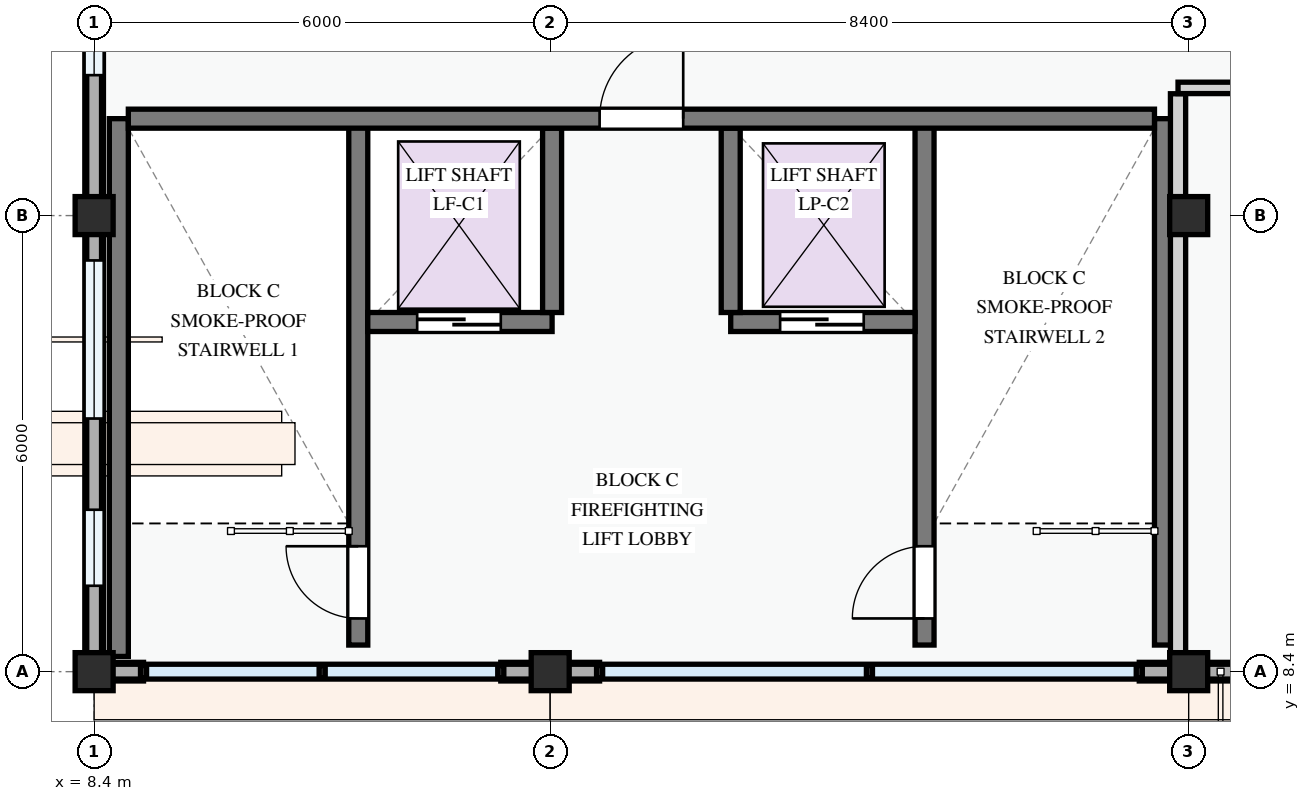
"""IFC4 building model, lengths in metres.
Left out: names, types, materials, properties, quantities, classifications, styles, units other than length and angle.
Written with IfcOpenShell. Run it as: python <this file> out.ifc"""

import sys

from ifc_helpers import new_model, si_unit, direction, frame, frame_2d, origin, origin_2d, place, context, subcontext, project, spatial, polyline, rectangle, outline, extrude, element, fill, save


model = new_model("IFC4")
c1 = context("Model", 3, precision=1e-05, world=origin(), true_north=direction((0.0, 1.0)))
c2 = subcontext(c1, "Body", "Model", "MODEL_VIEW")
j1 = project(units=[si_unit("LENGTHUNIT", "METRE"), si_unit("PLANEANGLEUNIT", "RADIAN")], contexts=[c1])
p1 = place(None, origin())
s1 = spatial("IfcSite", under=j1, at=p1, CompositionType="ELEMENT")
p2 = place(p1, origin())
s2 = spatial("IfcBuilding", under=s1, at=p2, CompositionType="ELEMENT")
p3 = place(p2, frame((0.0, 0.0, 34.5)))
s3 = spatial("IfcBuildingStorey", under=s2, at=p3, CompositionType="ELEMENT", Elevation=34.5)
for number, where, z_axis, x_axis in (
    (1, (8.4, 8.4, 0.0), (0.0, 0.0, 1.0), (1.0, 0.0, 0.0)),
    (2, (8.4, 14.4, 0.0), (0.0, 0.0, 1.0), (1.0, 0.0, 0.0)),
    (3, (14.4, 8.4, 0.0), (0.0, 0.0, 1.0), (1.0, 0.0, 0.0)),
    (4, (22.8, 8.4, 0.0), (0.0, 0.0, 1.0), (1.0, 0.0, 0.0)),
    (5, (22.8, 14.4, 0.0), (0.0, 0.0, 1.0), (1.0, 0.0, 0.0)),
):
    element("IfcColumn", number, at=place(p3, frame(where, z_axis=z_axis, x_axis=x_axis)), inside=s3, PredefinedType="COLUMN", context=c2, shape_type="SweptSolid", body=[
        extrude(rectangle(XDim=0.5, YDim=0.5, at=origin_2d()), origin(), (0.0, 0.0, 1.0), 3.3),
    ])
p4 = place(p3, frame((8.4, 22.8, 0.0), z_axis=(0.0, 0.0, 1.0), x_axis=(0.0, -1.0, 0.0)))
e6 = element("IfcWall", 6, at=p4, inside=s3, PredefinedType="STANDARD", context=c2, shape_type="SweptSolid", body=[
    extrude(rectangle(XDim=8.4, YDim=0.245, at=frame_2d((4.2, 0.0))), origin(), (0.0, 0.0, 1.0), 2.345),
])
p5 = place(p4, frame((1.305, 0.0, 0.78)))
e7 = element("IfcOpeningElement", 7, at=p5, cuts=e6, PredefinedType="OPENING", context=c2, shape_type="SweptSolid", body=[
    extrude(rectangle(XDim=1.78, YDim=1.42, at=frame_2d((0.89, 0.71))), frame((0.0, 0.133, 0.0), z_axis=(0.0, -1.0, 0.0), x_axis=(1.0, 0.0, 0.0)), (0.0, 0.0, 1.0), 0.265),
])
p6 = place(p4, frame((4.772, 0.0, 0.78)))
e8 = element("IfcOpeningElement", 8, at=p6, cuts=e6, PredefinedType="OPENING", context=c2, shape_type="SweptSolid", body=[
    extrude(rectangle(XDim=1.78, YDim=1.42, at=frame_2d((0.89, 0.71))), frame((0.0, 0.133, 0.0), z_axis=(0.0, -1.0, 0.0), x_axis=(1.0, 0.0, 0.0)), (0.0, 0.0, 1.0), 0.265),
])
p7 = place(p3, frame((8.4, 14.4, 0.0), z_axis=(0.0, 0.0, 1.0), x_axis=(0.0, -1.0, 0.0)))
e9 = element("IfcWall", 9, at=p7, inside=s3, PredefinedType="STANDARD", context=c2, shape_type="SweptSolid", body=[
    extrude(rectangle(XDim=6.0, YDim=0.245, at=frame_2d((3.0, 0.0))), origin(), (0.0, 0.0, 1.0), 2.445),
])
p8 = place(p7, frame((0.59, 0.0, 0.78)))
e10 = element("IfcOpeningElement", 10, at=p8, cuts=e9, PredefinedType="OPENING", context=c2, shape_type="SweptSolid", body=[
    extrude(rectangle(XDim=2.08, YDim=1.52, at=frame_2d((1.04, 0.76))), frame((0.0, 0.133, 0.0), z_axis=(0.0, -1.0, 0.0), x_axis=(1.0, 0.0, 0.0)), (0.0, 0.0, 1.0), 0.265),
])
p9 = place(p7, frame((3.87, 0.0, 0.78)))
e11 = element("IfcOpeningElement", 11, at=p9, cuts=e9, PredefinedType="OPENING", context=c2, shape_type="SweptSolid", body=[
    extrude(rectangle(XDim=1.0, YDim=1.25, at=frame_2d((0.5, 0.625))), frame((0.0, 0.133, 0.0), z_axis=(0.0, -1.0, 0.0), x_axis=(1.0, 0.0, 0.0)), (0.0, 0.0, 1.0), 0.265),
])
p10 = place(p3, frame((8.524, 8.4, 0.0), z_axis=(0.0, 0.0, 1.0), x_axis=(1.0, 0.0, 0.0)))
e12 = element("IfcWall", 12, at=p10, inside=s3, PredefinedType="STANDARD", context=c2, shape_type="SweptSolid", body=[
    extrude(rectangle(XDim=0.526, YDim=0.245, at=frame_2d((0.263, 0.0))), origin(), (0.0, 0.0, 1.0), 3.04),
])
p11 = place(p3, frame((13.75, 8.4, 0.0), z_axis=(0.0, 0.0, 1.0), x_axis=(1.0, 0.0, 0.0)))
e13 = element("IfcWall", 13, at=p11, inside=s3, PredefinedType="STANDARD", context=c2, shape_type="SweptSolid", body=[
    extrude(rectangle(XDim=0.65, YDim=0.245, at=frame_2d((0.325, 0.0))), origin(), (0.0, 0.0, 1.0), 3.04),
])
for number, where, z_axis, x_axis in (
    (14, (14.4, 8.4, 0.0), (0.0, 0.0, 1.0), (1.0, 0.0, 0.0)),
    (15, (22.15, 8.4, 0.0), (0.0, 0.0, 1.0), (1.0, 0.0, 0.0)),
):
    element("IfcWall", number, at=place(p3, frame(where, z_axis=z_axis, x_axis=x_axis)), inside=s3, PredefinedType="STANDARD", context=c2, shape_type="SweptSolid", body=[
        extrude(rectangle(XDim=0.65, YDim=0.245, at=frame_2d((0.325, 0.0))), origin(), (0.0, 0.0, 1.0), 3.04),
    ])
p12 = place(p3, frame((22.8, 8.4, 0.0), z_axis=(0.0, 0.0, 1.0), x_axis=(1.0, 0.0, 0.0)))
e16 = element("IfcWall", 16, at=p12, inside=s3, PredefinedType="STANDARD", context=c2, shape_type="SweptSolid", body=[
    extrude(rectangle(XDim=6.0, YDim=0.245, at=frame_2d((3.0, 0.0))), origin(), (0.0, 0.0, 1.0), 2.525),
])
p13 = place(p12, frame((0.62, 0.0, 0.0)))
e17 = element("IfcOpeningElement", 17, at=p13, cuts=e16, PredefinedType="OPENING", context=c2, shape_type="SweptSolid", body=[
    extrude(rectangle(XDim=1.3, YDim=2.15, at=frame_2d((0.65, 1.075))), frame((0.0, 0.133, 0.0), z_axis=(0.0, -1.0, 0.0), x_axis=(1.0, 0.0, 0.0)), (0.0, 0.0, 1.0), 0.265),
])
p14 = place(p12, frame((2.305, 0.0, 0.78)))
e18 = element("IfcOpeningElement", 18, at=p14, cuts=e16, PredefinedType="OPENING", context=c2, shape_type="SweptSolid", body=[
    extrude(rectangle(XDim=1.2, YDim=1.5, at=frame_2d((0.6, 0.75))), frame((0.0, 0.133, 0.0), z_axis=(0.0, -1.0, 0.0), x_axis=(1.0, 0.0, 0.0)), (0.0, 0.0, 1.0), 0.265),
])
p15 = place(p12, frame((4.225, 0.0, 0.78)))
e19 = element("IfcOpeningElement", 19, at=p15, cuts=e16, PredefinedType="OPENING", context=c2, shape_type="SweptSolid", body=[
    extrude(rectangle(XDim=1.2, YDim=1.35, at=frame_2d((0.6, 0.675))), frame((0.0, 0.133, 0.0), z_axis=(0.0, -1.0, 0.0), x_axis=(1.0, 0.0, 0.0)), (0.0, 0.0, 1.0), 0.265),
])
p16 = place(p3, frame((8.4, 22.8, 3.3), z_axis=(0.0, 0.0, 1.0), x_axis=(0.0, -1.0, 0.0)))
e20 = element("IfcWall", 20, at=p16, inside=s3, PredefinedType="PARAPET", context=c2, shape_type="SweptSolid", body=[
    extrude(outline(polyline([(0.0, 0.0), (8.4, 0.0), (8.4, 1.12), (7.7, 1.322), (7.0, 1.484), (6.3, 1.618), (5.6, 1.717), (4.9, 1.779), (4.2, 1.8), (3.5, 1.779), (2.8, 1.717), (2.1, 1.618), (1.4, 1.484), (0.7, 1.322), (0.0, 1.12), (0.0, 0.0)])), frame((0.0, 0.098, 0.0), z_axis=(0.0, -1.0, 0.0), x_axis=(1.0, 0.0, 0.0)), (0.0, 0.0, 1.0), 0.195),
])
for number, where, z_axis, x_axis in (
    (21, (8.4, 14.4, 3.3), (0.0, 0.0, 1.0), (0.0, -1.0, 0.0)),
    (22, (8.4, 8.4, 3.3), (0.0, 0.0, 1.0), (1.0, 0.0, 0.0)),
):
    element("IfcWall", number, at=place(p3, frame(where, z_axis=z_axis, x_axis=x_axis)), inside=s3, PredefinedType="PARAPET", context=c2, shape_type="SweptSolid", body=[
        extrude(outline(polyline([(0.0, 0.0), (6.0, 0.0), (6.0, 1.12), (5.5, 1.322), (5.0, 1.484), (4.5, 1.618), (4.0, 1.717), (3.5, 1.779), (3.0, 1.8), (2.5, 1.779), (2.0, 1.717), (1.5, 1.618), (1.0, 1.484), (0.5, 1.322), (0.0, 1.12), (0.0, 0.0)])), frame((0.0, 0.098, 0.0), z_axis=(0.0, -1.0, 0.0), x_axis=(1.0, 0.0, 0.0)), (0.0, 0.0, 1.0), 0.195),
    ])
p17 = place(p3, frame((14.4, 8.4, 3.3), z_axis=(0.0, 0.0, 1.0), x_axis=(1.0, 0.0, 0.0)))
e23 = element("IfcWall", 23, at=p17, inside=s3, PredefinedType="PARAPET", context=c2, shape_type="SweptSolid", body=[
    extrude(outline(polyline([(0.0, 0.0), (8.4, 0.0), (8.4, 1.12), (7.7, 1.322), (7.0, 1.484), (6.3, 1.618), (5.6, 1.717), (4.9, 1.779), (4.2, 1.8), (3.5, 1.779), (2.8, 1.717), (2.1, 1.618), (1.4, 1.484), (0.7, 1.322), (0.0, 1.12), (0.0, 0.0)])), frame((0.0, 0.098, 0.0), z_axis=(0.0, -1.0, 0.0), x_axis=(1.0, 0.0, 0.0)), (0.0, 0.0, 1.0), 0.195),
])
p18 = place(p3, frame((22.8, 8.4, 3.3), z_axis=(0.0, 0.0, 1.0), x_axis=(1.0, 0.0, 0.0)))
e24 = element("IfcWall", 24, at=p18, inside=s3, PredefinedType="PARAPET", context=c2, shape_type="SweptSolid", body=[
    extrude(outline(polyline([(0.0, 0.0), (6.0, 0.0), (6.0, 1.12), (5.5, 1.322), (5.0, 1.484), (4.5, 1.618), (4.0, 1.717), (3.5, 1.779), (3.0, 1.8), (2.5, 1.779), (2.0, 1.717), (1.5, 1.618), (1.0, 1.484), (0.5, 1.322), (0.0, 1.12), (0.0, 0.0)])), frame((0.0, 0.098, 0.0), z_axis=(0.0, -1.0, 0.0), x_axis=(1.0, 0.0, 0.0)), (0.0, 0.0, 1.0), 0.195),
])
p19 = place(p3, frame((11.875, 8.75, 0.0), z_axis=(0.0, 0.0, 1.0), x_axis=(0.0, 1.0, 0.0)))
e25 = element("IfcWall", 25, at=p19, inside=s3, PredefinedType="SHEAR", context=c2, shape_type="SweptSolid", body=[
    extrude(rectangle(XDim=6.925, YDim=0.25, at=frame_2d((3.462, 0.0))), origin(), (0.0, 0.0, 1.0), 3.0),
])
p20 = place(p19, frame((0.35, 0.0, 0.0)))
e26 = element("IfcOpeningElement", 26, at=p20, cuts=e25, PredefinedType="OPENING", context=c2, shape_type="SweptSolid", body=[
    extrude(rectangle(XDim=0.95, YDim=2.1, at=frame_2d((0.475, 1.05))), frame((0.0, 0.135, 0.0), z_axis=(0.0, -1.0, 0.0), x_axis=(1.0, 0.0, 0.0)), (0.0, 0.0, 1.0), 0.27),
])
p21 = place(p3, frame((8.725, 8.6, 0.0), z_axis=(0.0, 0.0, 1.0), x_axis=(0.0, 1.0, 0.0)))
e27 = element("IfcWall", 27, at=p21, inside=s3, PredefinedType="SHEAR", context=c2, shape_type="SweptSolid", body=[
    extrude(rectangle(XDim=7.075, YDim=0.25, at=frame_2d((3.538, 0.0))), origin(), (0.0, 0.0, 1.0), 3.0),
])
p22 = place(p3, frame((22.475, 8.75, 0.0), z_axis=(0.0, 0.0, 1.0), x_axis=(0.0, 1.0, 0.0)))
e28 = element("IfcWall", 28, at=p22, inside=s3, PredefinedType="SHEAR", context=c2, shape_type="SweptSolid", body=[
    extrude(rectangle(XDim=6.925, YDim=0.25, at=frame_2d((3.462, 0.0))), origin(), (0.0, 0.0, 1.0), 3.0),
])
p23 = place(p3, frame((19.325, 8.75, 0.0), z_axis=(0.0, 0.0, 1.0), x_axis=(0.0, 1.0, 0.0)))
e29 = element("IfcWall", 29, at=p23, inside=s3, PredefinedType="SHEAR", context=c2, shape_type="SweptSolid", body=[
    extrude(rectangle(XDim=6.925, YDim=0.25, at=frame_2d((3.462, 0.0))), origin(), (0.0, 0.0, 1.0), 3.0),
])
p24 = place(p23, frame((0.35, 0.0, 0.0)))
e30 = element("IfcOpeningElement", 30, at=p24, cuts=e29, PredefinedType="OPENING", context=c2, shape_type="SweptSolid", body=[
    extrude(rectangle(XDim=0.95, YDim=2.1, at=frame_2d((0.475, 1.05))), frame((0.0, 0.135, 0.0), z_axis=(0.0, -1.0, 0.0), x_axis=(1.0, 0.0, 0.0)), (0.0, 0.0, 1.0), 0.27),
])
p25 = place(p3, frame((12.0, 13.0, 0.0), z_axis=(0.0, 0.0, 1.0), x_axis=(1.0, 0.0, 0.0)))
e31 = element("IfcWall", 31, at=p25, inside=s3, PredefinedType="SHEAR", context=c2, shape_type="SweptSolid", body=[
    extrude(rectangle(XDim=2.425, YDim=0.25, at=frame_2d((1.212, 0.0))), origin(), (0.0, 0.0, 1.0), 3.0),
])
p26 = place(p25, frame((0.65, 0.0, 0.0)))
e32 = element("IfcOpeningElement", 32, at=p26, cuts=e31, PredefinedType="OPENING", context=c2, shape_type="SweptSolid", body=[
    extrude(rectangle(XDim=1.1, YDim=2.15, at=frame_2d((0.55, 1.075))), frame((0.0, 0.135, 0.0), z_axis=(0.0, -1.0, 0.0), x_axis=(1.0, 0.0, 0.0)), (0.0, 0.0, 1.0), 0.27),
])
p27 = place(p3, frame((16.775, 13.0, 0.0), z_axis=(0.0, 0.0, 1.0), x_axis=(1.0, 0.0, 0.0)))
e33 = element("IfcWall", 33, at=p27, inside=s3, PredefinedType="SHEAR", context=c2, shape_type="SweptSolid", body=[
    extrude(rectangle(XDim=2.425, YDim=0.25, at=frame_2d((1.212, 0.0))), origin(), (0.0, 0.0, 1.0), 3.0),
])
p28 = place(p27, frame((0.65, 0.0, 0.0)))
e34 = element("IfcOpeningElement", 34, at=p28, cuts=e33, PredefinedType="OPENING", context=c2, shape_type="SweptSolid", body=[
    extrude(rectangle(XDim=1.1, YDim=2.15, at=frame_2d((0.55, 1.075))), frame((0.0, 0.135, 0.0), z_axis=(0.0, -1.0, 0.0), x_axis=(1.0, 0.0, 0.0)), (0.0, 0.0, 1.0), 0.27),
])
for number, where, z_axis, x_axis in (
    (35, (14.425, 13.125, 0.0), (0.0, 0.0, 1.0), (0.0, 1.0, 0.0)),
    (36, (16.775, 13.125, 0.0), (0.0, 0.0, 1.0), (0.0, 1.0, 0.0)),
):
    element("IfcWall", number, at=place(p3, frame(where, z_axis=z_axis, x_axis=x_axis)), inside=s3, PredefinedType="SHEAR", context=c2, shape_type="SweptSolid", body=[
        extrude(rectangle(XDim=2.425, YDim=0.25, at=frame_2d((1.212, 0.0))), origin(), (0.0, 0.0, 1.0), 3.0),
    ])
p29 = place(p3, frame((8.85, 15.675, 0.0), z_axis=(0.0, 0.0, 1.0), x_axis=(1.0, 0.0, 0.0)))
e37 = element("IfcWall", 37, at=p29, inside=s3, PredefinedType="SHEAR", context=c2, shape_type="SweptSolid", body=[
    extrude(rectangle(XDim=13.5, YDim=0.25, at=frame_2d((6.75, 0.0))), origin(), (0.0, 0.0, 1.0), 3.0),
])
p30 = place(p29, frame((6.2, 0.0, 0.0)))
e38 = element("IfcOpeningElement", 38, at=p30, cuts=e37, PredefinedType="OPENING", context=c2, shape_type="SweptSolid", body=[
    extrude(rectangle(XDim=1.1, YDim=2.15, at=frame_2d((0.55, 1.075))), frame((0.0, 0.135, 0.0), z_axis=(0.0, -1.0, 0.0), x_axis=(1.0, 0.0, 0.0)), (0.0, 0.0, 1.0), 0.27),
])
p31 = place(p3, frame((22.66, 8.524, 0.0), z_axis=(0.0, 0.0, 1.0), x_axis=(0.0, 1.0, 0.0)))
e39 = element("IfcWall", 39, at=p31, inside=s3, PredefinedType="PARTITIONING", context=c2, shape_type="SweptSolid", body=[
    extrude(rectangle(XDim=7.479, YDim=0.2, at=frame_2d((3.739, 0.0))), origin(), (0.0, 0.0, 1.0), 2.425),
])
p32 = place(p3, frame((22.66, 16.08, 0.0), z_axis=(0.0, 0.0, 1.0), x_axis=(1.0, 0.0, 0.0)))
e40 = element("IfcWall", 40, at=p32, inside=s3, PredefinedType="PARTITIONING", context=c2, shape_type="SweptSolid", body=[
    extrude(rectangle(XDim=20.416, YDim=0.15, at=frame_2d((10.208, 0.0))), origin(), (0.0, 0.0, 1.0), 3.0),
])
p33 = place(p32, frame((2.691, 0.0, 0.0)))
e41 = element("IfcOpeningElement", 41, at=p33, cuts=e40, PredefinedType="OPENING", context=c2, shape_type="SweptSolid", body=[
    extrude(rectangle(XDim=0.92, YDim=2.1, at=frame_2d((0.46, 1.05))), frame((0.0, 0.085, 0.0), z_axis=(0.0, -1.0, 0.0), x_axis=(1.0, 0.0, 0.0)), (0.0, 0.0, 1.0), 0.17),
])
p34 = place(p32, frame((9.91, 0.0, 0.0)))
e42 = element("IfcOpeningElement", 42, at=p34, cuts=e40, PredefinedType="OPENING", context=c2, shape_type="SweptSolid", body=[
    extrude(rectangle(XDim=0.92, YDim=2.1, at=frame_2d((0.46, 1.05))), frame((0.0, 0.085, 0.0), z_axis=(0.0, -1.0, 0.0), x_axis=(1.0, 0.0, 0.0)), (0.0, 0.0, 1.0), 0.17),
])
p35 = place(p6, origin())
e43 = element("IfcWindow", 43, at=p35, inside=s3, PartitioningType="DOUBLE_PANEL_VERTICAL", PredefinedType="WINDOW", context=c2, shape_type="SweptSolid", body=[
    extrude(rectangle(XDim=1.78, YDim=1.42, at=frame_2d((0.89, 0.71))), frame((0.0, 0.03, 0.0), z_axis=(0.0, -1.0, 0.0), x_axis=(1.0, 0.0, 0.0)), (0.0, 0.0, 1.0), 0.06),
])
fill(e8, e43)
p36 = place(p8, origin())
e44 = element("IfcWindow", 44, at=p36, inside=s3, PartitioningType="DOUBLE_PANEL_VERTICAL", PredefinedType="WINDOW", context=c2, shape_type="SweptSolid", body=[
    extrude(rectangle(XDim=2.08, YDim=1.52, at=frame_2d((1.04, 0.76))), frame((0.0, 0.03, 0.0), z_axis=(0.0, -1.0, 0.0), x_axis=(1.0, 0.0, 0.0)), (0.0, 0.0, 1.0), 0.06),
])
fill(e10, e44)
p37 = place(p9, origin())
e45 = element("IfcWindow", 45, at=p37, inside=s3, PartitioningType="SINGLE_PANEL", PredefinedType="WINDOW", context=c2, shape_type="SweptSolid", body=[
    extrude(rectangle(XDim=1.0, YDim=1.25, at=frame_2d((0.5, 0.625))), frame((0.0, 0.03, 0.0), z_axis=(0.0, -1.0, 0.0), x_axis=(1.0, 0.0, 0.0)), (0.0, 0.0, 1.0), 0.06),
])
fill(e11, e45)
p38 = place(p20, origin())
e46 = element("IfcDoor", 46, at=p38, inside=s3, OperationType="SINGLE_SWING_RIGHT", PredefinedType="DOOR", context=c2, shape_type="SweptSolid", body=[
    extrude(rectangle(XDim=0.95, YDim=2.1, at=frame_2d((0.475, 1.05))), frame((0.0, 0.025, 0.0), z_axis=(0.0, -1.0, 0.0), x_axis=(1.0, 0.0, 0.0)), (0.0, 0.0, 1.0), 0.05),
])
fill(e26, e46)
p39 = place(p24, origin())
e47 = element("IfcDoor", 47, at=p39, inside=s3, OperationType="SINGLE_SWING_LEFT", PredefinedType="DOOR", context=c2, shape_type="SweptSolid", body=[
    extrude(rectangle(XDim=0.95, YDim=2.1, at=frame_2d((0.475, 1.05))), frame((0.0, 0.025, 0.0), z_axis=(0.0, -1.0, 0.0), x_axis=(1.0, 0.0, 0.0)), (0.0, 0.0, 1.0), 0.05),
])
fill(e30, e47)
p40 = place(p26, origin())
e48 = element("IfcDoor", 48, at=p40, inside=s3, OperationType="SLIDING_TO_LEFT", PredefinedType="DOOR", context=c2, shape_type="SweptSolid", body=[
    extrude(rectangle(XDim=1.1, YDim=2.15, at=frame_2d((0.55, 1.075))), frame((0.0, 0.025, 0.0), z_axis=(0.0, -1.0, 0.0), x_axis=(1.0, 0.0, 0.0)), (0.0, 0.0, 1.0), 0.05),
])
fill(e32, e48)
p41 = place(p28, origin())
e49 = element("IfcDoor", 49, at=p41, inside=s3, OperationType="SLIDING_TO_LEFT", PredefinedType="DOOR", context=c2, shape_type="SweptSolid", body=[
    extrude(rectangle(XDim=1.1, YDim=2.15, at=frame_2d((0.55, 1.075))), frame((0.0, 0.025, 0.0), z_axis=(0.0, -1.0, 0.0), x_axis=(1.0, 0.0, 0.0)), (0.0, 0.0, 1.0), 0.05),
])
fill(e34, e49)
p42 = place(p30, origin())
e50 = element("IfcDoor", 50, at=p42, inside=s3, OperationType="SINGLE_SWING_RIGHT", PredefinedType="DOOR", context=c2, shape_type="SweptSolid", body=[
    extrude(rectangle(XDim=1.1, YDim=2.15, at=frame_2d((0.55, 1.075))), frame((0.0, 0.025, 0.0), z_axis=(0.0, -1.0, 0.0), x_axis=(1.0, 0.0, 0.0)), (0.0, 0.0, 1.0), 0.05),
])
fill(e38, e50)
save(model, sys.argv[1])
